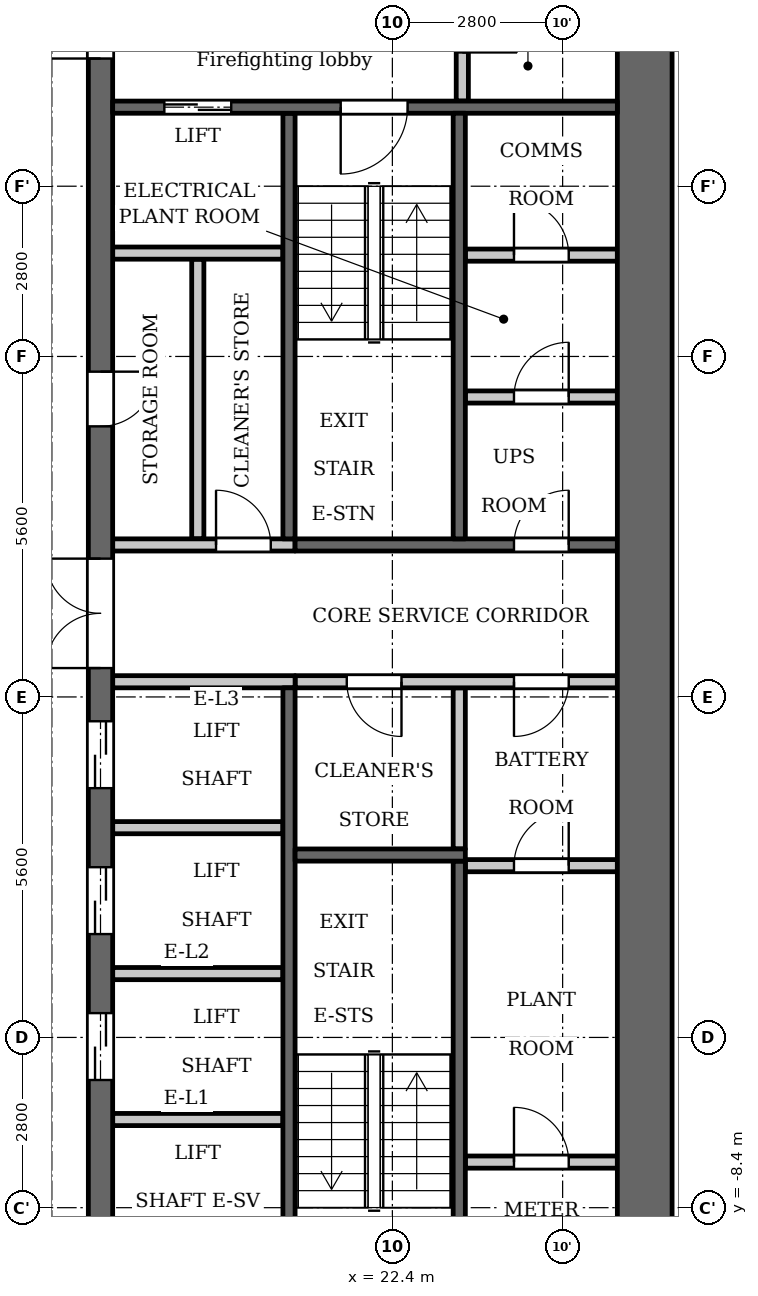
"""IFC4 building model, lengths in metres.
Left out: names, types, materials, properties, quantities, classifications, styles, units other than length and angle.
Written with IfcOpenShell. Run it as: python <this file> out.ifc"""

import sys

from ifc_helpers import new_model, si_unit, direction, frame, frame_2d, origin, place, context, subcontext, project, spatial, rectangle, extrude, element, fill, save


model = new_model("IFC4")
c1 = context("Model", 3, precision=1e-05, world=origin(), true_north=direction((0.0, 1.0)))
c2 = subcontext(c1, "Body", "Model", "MODEL_VIEW")
j1 = project(units=[si_unit("LENGTHUNIT", "METRE"), si_unit("PLANEANGLEUNIT", "RADIAN")], contexts=[c1])
p1 = place(None, origin())
s1 = spatial("IfcSite", under=j1, at=p1, CompositionType="ELEMENT")
p2 = place(p1, origin())
s2 = spatial("IfcBuilding", under=s1, at=p2, CompositionType="ELEMENT")
p3 = place(p2, frame((0.0, 0.0, 90.3)))
s3 = spatial("IfcBuildingStorey", under=s2, at=p3, CompositionType="ELEMENT", Elevation=90.3)
p4 = place(p3, frame((23.5, -2.5, 0.0), z_axis=(0.0, 0.0, 1.0), x_axis=(0.0, 1.0, 0.0)))
e1 = element("IfcWall", 1, at=p4, inside=s3, PredefinedType="PARTITIONING", context=c2, shape_type="SweptSolid", body=[
    extrude(rectangle(XDim=2.65, YDim=0.2, at=frame_2d((1.325, 0.0))), origin(), (0.0, 0.0, 1.0), 3.2),
])
p5 = place(p3, frame((20.7, 2.6, 0.0), z_axis=(0.0, 0.0, 1.0), x_axis=(0.0, 1.0, 0.0)))
e2 = element("IfcWall", 2, at=p5, inside=s3, PredefinedType="SHEAR", context=c2, shape_type="SweptSolid", body=[
    extrude(rectangle(XDim=7.0, YDim=0.2, at=frame_2d((3.5, 0.0))), origin(), (0.0, 0.0, 1.0), 3.2),
])
p6 = place(p3, frame((20.7, -9.6, 0.0), z_axis=(0.0, 0.0, 1.0), x_axis=(0.0, 1.0, 0.0)))
e3 = element("IfcWall", 3, at=p6, inside=s3, PredefinedType="SHEAR", context=c2, shape_type="SweptSolid", body=[
    extrude(rectangle(XDim=9.75, YDim=0.2, at=frame_2d((4.875, 0.0))), origin(), (0.0, 0.0, 1.0), 3.2),
])
p7 = place(p3, frame((20.8, 2.5, 0.0), z_axis=(0.0, 0.0, 1.0), x_axis=(1.0, 0.0, 0.0)))
e4 = element("IfcWall", 4, at=p7, inside=s3, PredefinedType="SHEAR", context=c2, shape_type="SweptSolid", body=[
    extrude(rectangle(XDim=5.3, YDim=0.2, at=frame_2d((2.65, 0.0))), origin(), (0.0, 0.0, 1.0), 3.2),
])
p8 = place(p7, frame((3.6, 0.0, 0.0)))
e5 = element("IfcOpeningElement", 5, at=p8, cuts=e4, PredefinedType="OPENING", context=c2, shape_type="SweptSolid", body=[
    extrude(rectangle(XDim=0.9, YDim=2.1, at=frame_2d((0.45, 1.05))), frame((0.0, 0.11, 0.0), z_axis=(0.0, -1.0, 0.0), x_axis=(1.0, 0.0, 0.0)), (0.0, 0.0, 1.0), 0.22),
])
p9 = place(p3, frame((20.8, 0.25, 0.0), z_axis=(0.0, 0.0, 1.0), x_axis=(1.0, 0.0, 0.0)))
e6 = element("IfcWall", 6, at=p9, inside=s3, PredefinedType="PARTITIONING", context=c2, shape_type="SweptSolid", body=[
    extrude(rectangle(XDim=5.3, YDim=0.2, at=frame_2d((2.65, 0.0))), origin(), (0.0, 0.0, 1.0), 3.2),
])
p10 = place(p9, frame((0.85, 0.0, 0.0)))
e7 = element("IfcOpeningElement", 7, at=p10, cuts=e6, PredefinedType="OPENING", context=c2, shape_type="SweptSolid", body=[
    extrude(rectangle(XDim=0.9, YDim=2.1, at=frame_2d((0.45, 1.05))), frame((0.0, 0.11, 0.0), z_axis=(0.0, -1.0, 0.0), x_axis=(1.0, 0.0, 0.0)), (0.0, 0.0, 1.0), 0.22),
])
p11 = place(p9, frame((3.6, 0.0, 0.0)))
e8 = element("IfcOpeningElement", 8, at=p11, cuts=e6, PredefinedType="OPENING", context=c2, shape_type="SweptSolid", body=[
    extrude(rectangle(XDim=0.9, YDim=2.1, at=frame_2d((0.45, 1.05))), frame((0.0, 0.11, 0.0), z_axis=(0.0, -1.0, 0.0), x_axis=(1.0, 0.0, 0.0)), (0.0, 0.0, 1.0), 0.22),
])
p12 = place(p3, frame((19.2, 2.6, 0.0), z_axis=(0.0, 0.0, 1.0), x_axis=(0.0, 1.0, 0.0)))
e9 = element("IfcWall", 9, at=p12, inside=s3, PredefinedType="PARTITIONING", context=c2, shape_type="SweptSolid", body=[
    extrude(rectangle(XDim=4.6, YDim=0.2, at=frame_2d((2.3, 0.0))), origin(), (0.0, 0.0, 1.0), 3.2),
])
p13 = place(p3, frame((17.6, -12.3, 0.0), z_axis=(0.0, 0.0, 1.0), x_axis=(0.0, 1.0, 0.0)))
e10 = element("IfcWall", 10, at=p13, inside=s3, PredefinedType="SHEAR", context=c2, shape_type="SweptSolid", body=[
    extrude(rectangle(XDim=24.6, YDim=0.4, at=frame_2d((12.3, 0.0))), origin(), (0.0, 0.0, 1.0), 3.2),
])
p14 = place(p13, frame((6.0, 0.0, 0.0)))
e11 = element("IfcOpeningElement", 11, at=p14, cuts=e10, PredefinedType="OPENING", context=c2, shape_type="SweptSolid", body=[
    extrude(rectangle(XDim=1.1, YDim=2.1, at=frame_2d((0.55, 1.05))), frame((0.0, 0.21, 0.0), z_axis=(0.0, -1.0, 0.0), x_axis=(1.0, 0.0, 0.0)), (0.0, 0.0, 1.0), 0.42),
])
p15 = place(p13, frame((8.4, 0.0, 0.0)))
e12 = element("IfcOpeningElement", 12, at=p15, cuts=e10, PredefinedType="OPENING", context=c2, shape_type="SweptSolid", body=[
    extrude(rectangle(XDim=1.1, YDim=2.1, at=frame_2d((0.55, 1.05))), frame((0.0, 0.21, 0.0), z_axis=(0.0, -1.0, 0.0), x_axis=(1.0, 0.0, 0.0)), (0.0, 0.0, 1.0), 0.42),
])
p16 = place(p13, frame((10.8, 0.0, 0.0)))
e13 = element("IfcOpeningElement", 13, at=p16, cuts=e10, PredefinedType="OPENING", context=c2, shape_type="SweptSolid", body=[
    extrude(rectangle(XDim=1.1, YDim=2.1, at=frame_2d((0.55, 1.05))), frame((0.0, 0.21, 0.0), z_axis=(0.0, -1.0, 0.0), x_axis=(1.0, 0.0, 0.0)), (0.0, 0.0, 1.0), 0.42),
])
p17 = place(p13, frame((16.75, 0.0, 0.0)))
e14 = element("IfcOpeningElement", 14, at=p17, cuts=e10, PredefinedType="OPENING", context=c2, shape_type="SweptSolid", body=[
    extrude(rectangle(XDim=0.9, YDim=2.1, at=frame_2d((0.45, 1.05))), frame((0.0, 0.21, 0.0), z_axis=(0.0, -1.0, 0.0), x_axis=(1.0, 0.0, 0.0)), (0.0, 0.0, 1.0), 0.42),
])
p18 = place(p13, frame((22.8, 0.0, 0.0)))
e15 = element("IfcOpeningElement", 15, at=p18, cuts=e10, PredefinedType="OPENING", context=c2, shape_type="SweptSolid", body=[
    extrude(rectangle(XDim=1.1, YDim=2.1, at=frame_2d((0.55, 1.05))), frame((0.0, 0.21, 0.0), z_axis=(0.0, -1.0, 0.0), x_axis=(1.0, 0.0, 0.0)), (0.0, 0.0, 1.0), 0.42),
])
p19 = place(p13, frame((0.7, 0.0, 0.0)))
e16 = element("IfcOpeningElement", 16, at=p19, cuts=e10, PredefinedType="OPENING", context=c2, shape_type="SweptSolid", body=[
    extrude(rectangle(XDim=1.1, YDim=2.1, at=frame_2d((0.55, 1.05))), frame((0.0, 0.21, 0.0), z_axis=(0.0, -1.0, 0.0), x_axis=(1.0, 0.0, 0.0)), (0.0, 0.0, 1.0), 0.42),
])
p20 = place(p13, frame((12.775, 0.0, 0.0)))
e17 = element("IfcOpeningElement", 17, at=p20, cuts=e10, PredefinedType="OPENING", context=c2, shape_type="SweptSolid", body=[
    extrude(rectangle(XDim=1.8, YDim=2.1, at=frame_2d((0.9, 1.05))), frame((0.0, 0.21, 0.0), z_axis=(0.0, -1.0, 0.0), x_axis=(1.0, 0.0, 0.0)), (0.0, 0.0, 1.0), 0.42),
])
p21 = place(p3, frame((26.55, -12.3, 0.0), z_axis=(0.0, 0.0, 1.0), x_axis=(0.0, 1.0, 0.0)))
e18 = element("IfcWall", 18, at=p21, inside=s3, PredefinedType="SHEAR", context=c2, shape_type="SweptSolid", body=[
    extrude(rectangle(XDim=24.6, YDim=0.9, at=frame_2d((12.3, 0.0))), origin(), (0.0, 0.0, 1.0), 3.2),
])
p22 = place(p3, frame((23.55, 9.8, 0.0), z_axis=(0.0, 0.0, 1.0), x_axis=(0.0, 1.0, 0.0)))
e19 = element("IfcWall", 19, at=p22, inside=s3, PredefinedType="PARTITIONING", context=c2, shape_type="SweptSolid", body=[
    extrude(rectangle(XDim=2.5, YDim=0.2, at=frame_2d((1.25, 0.0))), origin(), (0.0, 0.0, 1.0), 3.2),
])
p23 = place(p22, frame((0.8, 0.0, 0.0)))
e20 = element("IfcOpeningElement", 20, at=p23, cuts=e19, PredefinedType="OPENING", context=c2, shape_type="SweptSolid", body=[
    extrude(rectangle(XDim=0.9, YDim=2.1, at=frame_2d((0.45, 1.05))), frame((0.0, 0.11, 0.0), z_axis=(0.0, -1.0, 0.0), x_axis=(1.0, 0.0, 0.0)), (0.0, 0.0, 1.0), 0.22),
])
p24 = place(p3, frame((23.6, -7.65, 0.0), z_axis=(0.0, 0.0, 1.0), x_axis=(1.0, 0.0, 0.0)))
e21 = element("IfcWall", 21, at=p24, inside=s3, PredefinedType="PARTITIONING", context=c2, shape_type="SweptSolid", body=[
    extrude(rectangle(XDim=2.5, YDim=0.2, at=frame_2d((1.25, 0.0))), origin(), (0.0, 0.0, 1.0), 3.2),
])
p25 = place(p24, frame((0.8, 0.0, 0.0)))
e22 = element("IfcOpeningElement", 22, at=p25, cuts=e21, PredefinedType="OPENING", context=c2, shape_type="SweptSolid", body=[
    extrude(rectangle(XDim=0.9, YDim=2.1, at=frame_2d((0.45, 1.05))), frame((0.0, 0.11, 0.0), z_axis=(0.0, -1.0, 0.0), x_axis=(1.0, 0.0, 0.0)), (0.0, 0.0, 1.0), 0.22),
])
p26 = place(p3, frame((23.6, -2.775, 0.0), z_axis=(0.0, 0.0, 1.0), x_axis=(1.0, 0.0, 0.0)))
e23 = element("IfcWall", 23, at=p26, inside=s3, PredefinedType="PARTITIONING", context=c2, shape_type="SweptSolid", body=[
    extrude(rectangle(XDim=2.5, YDim=0.2, at=frame_2d((1.25, 0.0))), origin(), (0.0, 0.0, 1.0), 3.2),
])
p27 = place(p26, frame((0.8, 0.0, 0.0)))
e24 = element("IfcOpeningElement", 24, at=p27, cuts=e23, PredefinedType="OPENING", context=c2, shape_type="SweptSolid", body=[
    extrude(rectangle(XDim=0.9, YDim=2.1, at=frame_2d((0.45, 1.05))), frame((0.0, 0.11, 0.0), z_axis=(0.0, -1.0, 0.0), x_axis=(1.0, 0.0, 0.0)), (0.0, 0.0, 1.0), 0.22),
])
p28 = place(p3, frame((23.6, 4.933, 0.0), z_axis=(0.0, 0.0, 1.0), x_axis=(1.0, 0.0, 0.0)))
e25 = element("IfcWall", 25, at=p28, inside=s3, PredefinedType="PARTITIONING", context=c2, shape_type="SweptSolid", body=[
    extrude(rectangle(XDim=2.5, YDim=0.2, at=frame_2d((1.25, 0.0))), origin(), (0.0, 0.0, 1.0), 3.2),
])
p29 = place(p28, frame((0.8, 0.0, 0.0)))
e26 = element("IfcOpeningElement", 26, at=p29, cuts=e25, PredefinedType="OPENING", context=c2, shape_type="SweptSolid", body=[
    extrude(rectangle(XDim=0.9, YDim=2.1, at=frame_2d((0.45, 1.05))), frame((0.0, 0.11, 0.0), z_axis=(0.0, -1.0, 0.0), x_axis=(1.0, 0.0, 0.0)), (0.0, 0.0, 1.0), 0.22),
])
p30 = place(p3, frame((23.6, 7.267, 0.0), z_axis=(0.0, 0.0, 1.0), x_axis=(1.0, 0.0, 0.0)))
e27 = element("IfcWall", 27, at=p30, inside=s3, PredefinedType="PARTITIONING", context=c2, shape_type="SweptSolid", body=[
    extrude(rectangle(XDim=2.5, YDim=0.2, at=frame_2d((1.25, 0.0))), origin(), (0.0, 0.0, 1.0), 3.2),
])
p31 = place(p30, frame((0.8, 0.0, 0.0)))
e28 = element("IfcOpeningElement", 28, at=p31, cuts=e27, PredefinedType="OPENING", context=c2, shape_type="SweptSolid", body=[
    extrude(rectangle(XDim=0.9, YDim=2.1, at=frame_2d((0.45, 1.05))), frame((0.0, 0.11, 0.0), z_axis=(0.0, -1.0, 0.0), x_axis=(1.0, 0.0, 0.0)), (0.0, 0.0, 1.0), 0.22),
])
for number, where, z_axis, x_axis in (
    (29, (17.8, -6.95, 0.0), (0.0, 0.0, 1.0), (1.0, 0.0, 0.0)),
    (30, (17.8, -4.55, 0.0), (0.0, 0.0, 1.0), (1.0, 0.0, 0.0)),
    (31, (17.8, -2.15, 0.0), (0.0, 0.0, 1.0), (1.0, 0.0, 0.0)),
):
    element("IfcWall", number, at=place(p3, frame(where, z_axis=z_axis, x_axis=x_axis)), inside=s3, PredefinedType="PARTITIONING", context=c2, shape_type="SweptSolid", body=[
        extrude(rectangle(XDim=2.8, YDim=0.2, at=frame_2d((1.4, 0.0))), origin(), (0.0, 0.0, 1.0), 3.2),
    ])
p32 = place(p3, frame((17.8, 0.25, 0.0), z_axis=(0.0, 0.0, 1.0), x_axis=(1.0, 0.0, 0.0)))
e32 = element("IfcWall", 32, at=p32, inside=s3, PredefinedType="PARTITIONING", context=c2, shape_type="SweptSolid", body=[
    extrude(rectangle(XDim=3.0, YDim=0.2, at=frame_2d((1.5, 0.0))), origin(), (0.0, 0.0, 1.0), 3.2),
])
p33 = place(p3, frame((17.8, 2.5, 0.0), z_axis=(0.0, 0.0, 1.0), x_axis=(1.0, 0.0, 0.0)))
e33 = element("IfcWall", 33, at=p33, inside=s3, PredefinedType="PARTITIONING", context=c2, shape_type="SweptSolid", body=[
    extrude(rectangle(XDim=3.0, YDim=0.2, at=frame_2d((1.5, 0.0))), origin(), (0.0, 0.0, 1.0), 3.2),
])
p34 = place(p33, frame((1.7, 0.0, 0.0)))
e34 = element("IfcOpeningElement", 34, at=p34, cuts=e33, PredefinedType="OPENING", context=c2, shape_type="SweptSolid", body=[
    extrude(rectangle(XDim=0.9, YDim=2.1, at=frame_2d((0.45, 1.05))), frame((0.0, 0.11, 0.0), z_axis=(0.0, -1.0, 0.0), x_axis=(1.0, 0.0, 0.0)), (0.0, 0.0, 1.0), 0.22),
])
p35 = place(p3, frame((17.8, 7.3, 0.0), z_axis=(0.0, 0.0, 1.0), x_axis=(1.0, 0.0, 0.0)))
e35 = element("IfcWall", 35, at=p35, inside=s3, PredefinedType="PARTITIONING", context=c2, shape_type="SweptSolid", body=[
    extrude(rectangle(XDim=2.8, YDim=0.2, at=frame_2d((1.4, 0.0))), origin(), (0.0, 0.0, 1.0), 3.2),
])
p36 = place(p3, frame((17.8, 9.7, 0.0), z_axis=(0.0, 0.0, 1.0), x_axis=(1.0, 0.0, 0.0)))
e36 = element("IfcWall", 36, at=p36, inside=s3, PredefinedType="SHEAR", context=c2, shape_type="SweptSolid", body=[
    extrude(rectangle(XDim=8.3, YDim=0.2, at=frame_2d((4.15, 0.0))), origin(), (0.0, 0.0, 1.0), 3.2),
])
p37 = place(p36, frame((0.85, 0.0, 0.0)))
e37 = element("IfcOpeningElement", 37, at=p37, cuts=e36, PredefinedType="OPENING", context=c2, shape_type="SweptSolid", body=[
    extrude(rectangle(XDim=1.1, YDim=2.1, at=frame_2d((0.55, 1.05))), frame((0.0, 0.11, 0.0), z_axis=(0.0, -1.0, 0.0), x_axis=(1.0, 0.0, 0.0)), (0.0, 0.0, 1.0), 0.22),
])
p38 = place(p36, frame((3.75, 0.0, 0.0)))
e38 = element("IfcOpeningElement", 38, at=p38, cuts=e36, PredefinedType="OPENING", context=c2, shape_type="SweptSolid", body=[
    extrude(rectangle(XDim=1.1, YDim=2.1, at=frame_2d((0.55, 1.05))), frame((0.0, 0.11, 0.0), z_axis=(0.0, -1.0, 0.0), x_axis=(1.0, 0.0, 0.0)), (0.0, 0.0, 1.0), 0.22),
])
p39 = place(p3, frame((23.5, 2.6, 0.0), z_axis=(0.0, 0.0, 1.0), x_axis=(0.0, 1.0, 0.0)))
e39 = element("IfcWall", 39, at=p39, inside=s3, PredefinedType="SHEAR", context=c2, shape_type="SweptSolid", body=[
    extrude(rectangle(XDim=7.0, YDim=0.2, at=frame_2d((3.5, 0.0))), origin(), (0.0, 0.0, 1.0), 3.2),
])
p40 = place(p3, frame((23.5, -9.6, 0.0), z_axis=(0.0, 0.0, 1.0), x_axis=(0.0, 1.0, 0.0)))
e40 = element("IfcWall", 40, at=p40, inside=s3, PredefinedType="SHEAR", context=c2, shape_type="SweptSolid", body=[
    extrude(rectangle(XDim=6.9, YDim=0.2, at=frame_2d((3.45, 0.0))), origin(), (0.0, 0.0, 1.0), 3.2),
])
p41 = place(p3, frame((20.8, -2.6, 0.0), z_axis=(0.0, 0.0, 1.0), x_axis=(1.0, 0.0, 0.0)))
e41 = element("IfcWall", 41, at=p41, inside=s3, PredefinedType="SHEAR", context=c2, shape_type="SweptSolid", body=[
    extrude(rectangle(XDim=2.8, YDim=0.2, at=frame_2d((1.4, 0.0))), origin(), (0.0, 0.0, 1.0), 3.2),
])
p42 = place(p14, origin())
e42 = element("IfcDoor", 42, at=p42, inside=s3, OperationType="DOUBLE_DOOR_SLIDING", PredefinedType="DOOR", context=c2, shape_type="SweptSolid", body=[
    extrude(rectangle(XDim=1.1, YDim=2.1, at=frame_2d((0.55, 1.05))), frame((0.0, 0.025, 0.0), z_axis=(0.0, -1.0, 0.0), x_axis=(1.0, 0.0, 0.0)), (0.0, 0.0, 1.0), 0.05),
])
fill(e11, e42)
p43 = place(p15, origin())
e43 = element("IfcDoor", 43, at=p43, inside=s3, OperationType="DOUBLE_DOOR_SLIDING", PredefinedType="DOOR", context=c2, shape_type="SweptSolid", body=[
    extrude(rectangle(XDim=1.1, YDim=2.1, at=frame_2d((0.55, 1.05))), frame((0.0, 0.025, 0.0), z_axis=(0.0, -1.0, 0.0), x_axis=(1.0, 0.0, 0.0)), (0.0, 0.0, 1.0), 0.05),
])
fill(e12, e43)
p44 = place(p16, origin())
e44 = element("IfcDoor", 44, at=p44, inside=s3, OperationType="DOUBLE_DOOR_SLIDING", PredefinedType="DOOR", context=c2, shape_type="SweptSolid", body=[
    extrude(rectangle(XDim=1.1, YDim=2.1, at=frame_2d((0.55, 1.05))), frame((0.0, 0.025, 0.0), z_axis=(0.0, -1.0, 0.0), x_axis=(1.0, 0.0, 0.0)), (0.0, 0.0, 1.0), 0.05),
])
fill(e13, e44)
p45 = place(p17, origin())
e45 = element("IfcDoor", 45, at=p45, inside=s3, OperationType="SINGLE_SWING_RIGHT", PredefinedType="DOOR", context=c2, shape_type="SweptSolid", body=[
    extrude(rectangle(XDim=0.9, YDim=2.1, at=frame_2d((0.45, 1.05))), frame((0.0, 0.025, 0.0), z_axis=(0.0, -1.0, 0.0), x_axis=(1.0, 0.0, 0.0)), (0.0, 0.0, 1.0), 0.05),
])
fill(e14, e45)
p46 = place(p34, origin())
e46 = element("IfcDoor", 46, at=p46, inside=s3, OperationType="SINGLE_SWING_RIGHT", PredefinedType="DOOR", context=c2, shape_type="SweptSolid", body=[
    extrude(rectangle(XDim=0.9, YDim=2.1, at=frame_2d((0.45, 1.05))), frame((0.0, 0.025, 0.0), z_axis=(0.0, -1.0, 0.0), x_axis=(1.0, 0.0, 0.0)), (0.0, 0.0, 1.0), 0.05),
])
fill(e34, e46)
p47 = place(p37, origin())
e47 = element("IfcDoor", 47, at=p47, inside=s3, OperationType="DOUBLE_DOOR_SLIDING", PredefinedType="DOOR", context=c2, shape_type="SweptSolid", body=[
    extrude(rectangle(XDim=1.1, YDim=2.1, at=frame_2d((0.55, 1.05))), frame((0.0, 0.025, 0.0), z_axis=(0.0, -1.0, 0.0), x_axis=(1.0, 0.0, 0.0)), (0.0, 0.0, 1.0), 0.05),
])
fill(e37, e47)
p48 = place(p18, origin())
e48 = element("IfcDoor", 48, at=p48, inside=s3, OperationType="SINGLE_SWING_RIGHT", PredefinedType="DOOR", context=c2, shape_type="SweptSolid", body=[
    extrude(rectangle(XDim=1.1, YDim=2.1, at=frame_2d((0.55, 1.05))), frame((0.0, 0.025, 0.0), z_axis=(0.0, -1.0, 0.0), x_axis=(1.0, 0.0, 0.0)), (0.0, 0.0, 1.0), 0.05),
])
fill(e15, e48)
p49 = place(p38, origin())
e49 = element("IfcDoor", 49, at=p49, inside=s3, OperationType="SINGLE_SWING_LEFT", PredefinedType="DOOR", context=c2, shape_type="SweptSolid", body=[
    extrude(rectangle(XDim=1.1, YDim=2.1, at=frame_2d((0.55, 1.05))), frame((0.0, 0.025, 0.0), z_axis=(0.0, -1.0, 0.0), x_axis=(1.0, 0.0, 0.0)), (0.0, 0.0, 1.0), 0.05),
])
fill(e38, e49)
p50 = place(p20, origin())
e50 = element("IfcDoor", 50, at=p50, inside=s3, OperationType="DOUBLE_DOOR_SINGLE_SWING", PredefinedType="DOOR", context=c2, shape_type="SweptSolid", body=[
    extrude(rectangle(XDim=1.8, YDim=2.1, at=frame_2d((0.9, 1.05))), frame((0.0, 0.025, 0.0), z_axis=(0.0, -1.0, 0.0), x_axis=(1.0, 0.0, 0.0)), (0.0, 0.0, 1.0), 0.05),
])
fill(e17, e50)
p51 = place(p10, origin())
e51 = element("IfcDoor", 51, at=p51, inside=s3, OperationType="SINGLE_SWING_RIGHT", PredefinedType="DOOR", context=c2, shape_type="SweptSolid", body=[
    extrude(rectangle(XDim=0.9, YDim=2.1, at=frame_2d((0.45, 1.05))), frame((0.0, 0.025, 0.0), z_axis=(0.0, -1.0, 0.0), x_axis=(1.0, 0.0, 0.0)), (0.0, 0.0, 1.0), 0.05),
])
fill(e7, e51)
p52 = place(p25, origin())
e52 = element("IfcDoor", 52, at=p52, inside=s3, OperationType="SINGLE_SWING_RIGHT", PredefinedType="DOOR", context=c2, shape_type="SweptSolid", body=[
    extrude(rectangle(XDim=0.9, YDim=2.1, at=frame_2d((0.45, 1.05))), frame((0.0, 0.025, 0.0), z_axis=(0.0, -1.0, 0.0), x_axis=(1.0, 0.0, 0.0)), (0.0, 0.0, 1.0), 0.05),
])
fill(e22, e52)
p53 = place(p27, origin())
e53 = element("IfcDoor", 53, at=p53, inside=s3, OperationType="SINGLE_SWING_LEFT", PredefinedType="DOOR", context=c2, shape_type="SweptSolid", body=[
    extrude(rectangle(XDim=0.9, YDim=2.1, at=frame_2d((0.45, 1.05))), frame((0.0, 0.025, 0.0), z_axis=(0.0, -1.0, 0.0), x_axis=(1.0, 0.0, 0.0)), (0.0, 0.0, 1.0), 0.05),
])
fill(e24, e53)
p54 = place(p11, origin())
e54 = element("IfcDoor", 54, at=p54, inside=s3, OperationType="SINGLE_SWING_LEFT", PredefinedType="DOOR", context=c2, shape_type="SweptSolid", body=[
    extrude(rectangle(XDim=0.9, YDim=2.1, at=frame_2d((0.45, 1.05))), frame((0.0, 0.025, 0.0), z_axis=(0.0, -1.0, 0.0), x_axis=(1.0, 0.0, 0.0)), (0.0, 0.0, 1.0), 0.05),
])
fill(e8, e54)
p55 = place(p29, origin())
e55 = element("IfcDoor", 55, at=p55, inside=s3, OperationType="SINGLE_SWING_LEFT", PredefinedType="DOOR", context=c2, shape_type="SweptSolid", body=[
    extrude(rectangle(XDim=0.9, YDim=2.1, at=frame_2d((0.45, 1.05))), frame((0.0, 0.025, 0.0), z_axis=(0.0, -1.0, 0.0), x_axis=(1.0, 0.0, 0.0)), (0.0, 0.0, 1.0), 0.05),
])
fill(e26, e55)
p56 = place(p31, origin())
e56 = element("IfcDoor", 56, at=p56, inside=s3, OperationType="SINGLE_SWING_RIGHT", PredefinedType="DOOR", context=c2, shape_type="SweptSolid", body=[
    extrude(rectangle(XDim=0.9, YDim=2.1, at=frame_2d((0.45, 1.05))), frame((0.0, 0.025, 0.0), z_axis=(0.0, -1.0, 0.0), x_axis=(1.0, 0.0, 0.0)), (0.0, 0.0, 1.0), 0.05),
])
fill(e28, e56)
p57 = place(p8, origin())
e57 = element("IfcDoor", 57, at=p57, inside=s3, OperationType="SINGLE_SWING_LEFT", PredefinedType="DOOR", context=c2, shape_type="SweptSolid", body=[
    extrude(rectangle(XDim=0.9, YDim=2.1, at=frame_2d((0.45, 1.05))), frame((0.0, 0.025, 0.0), z_axis=(0.0, -1.0, 0.0), x_axis=(1.0, 0.0, 0.0)), (0.0, 0.0, 1.0), 0.05),
])
fill(e5, e57)
save(model, sys.argv[1])
